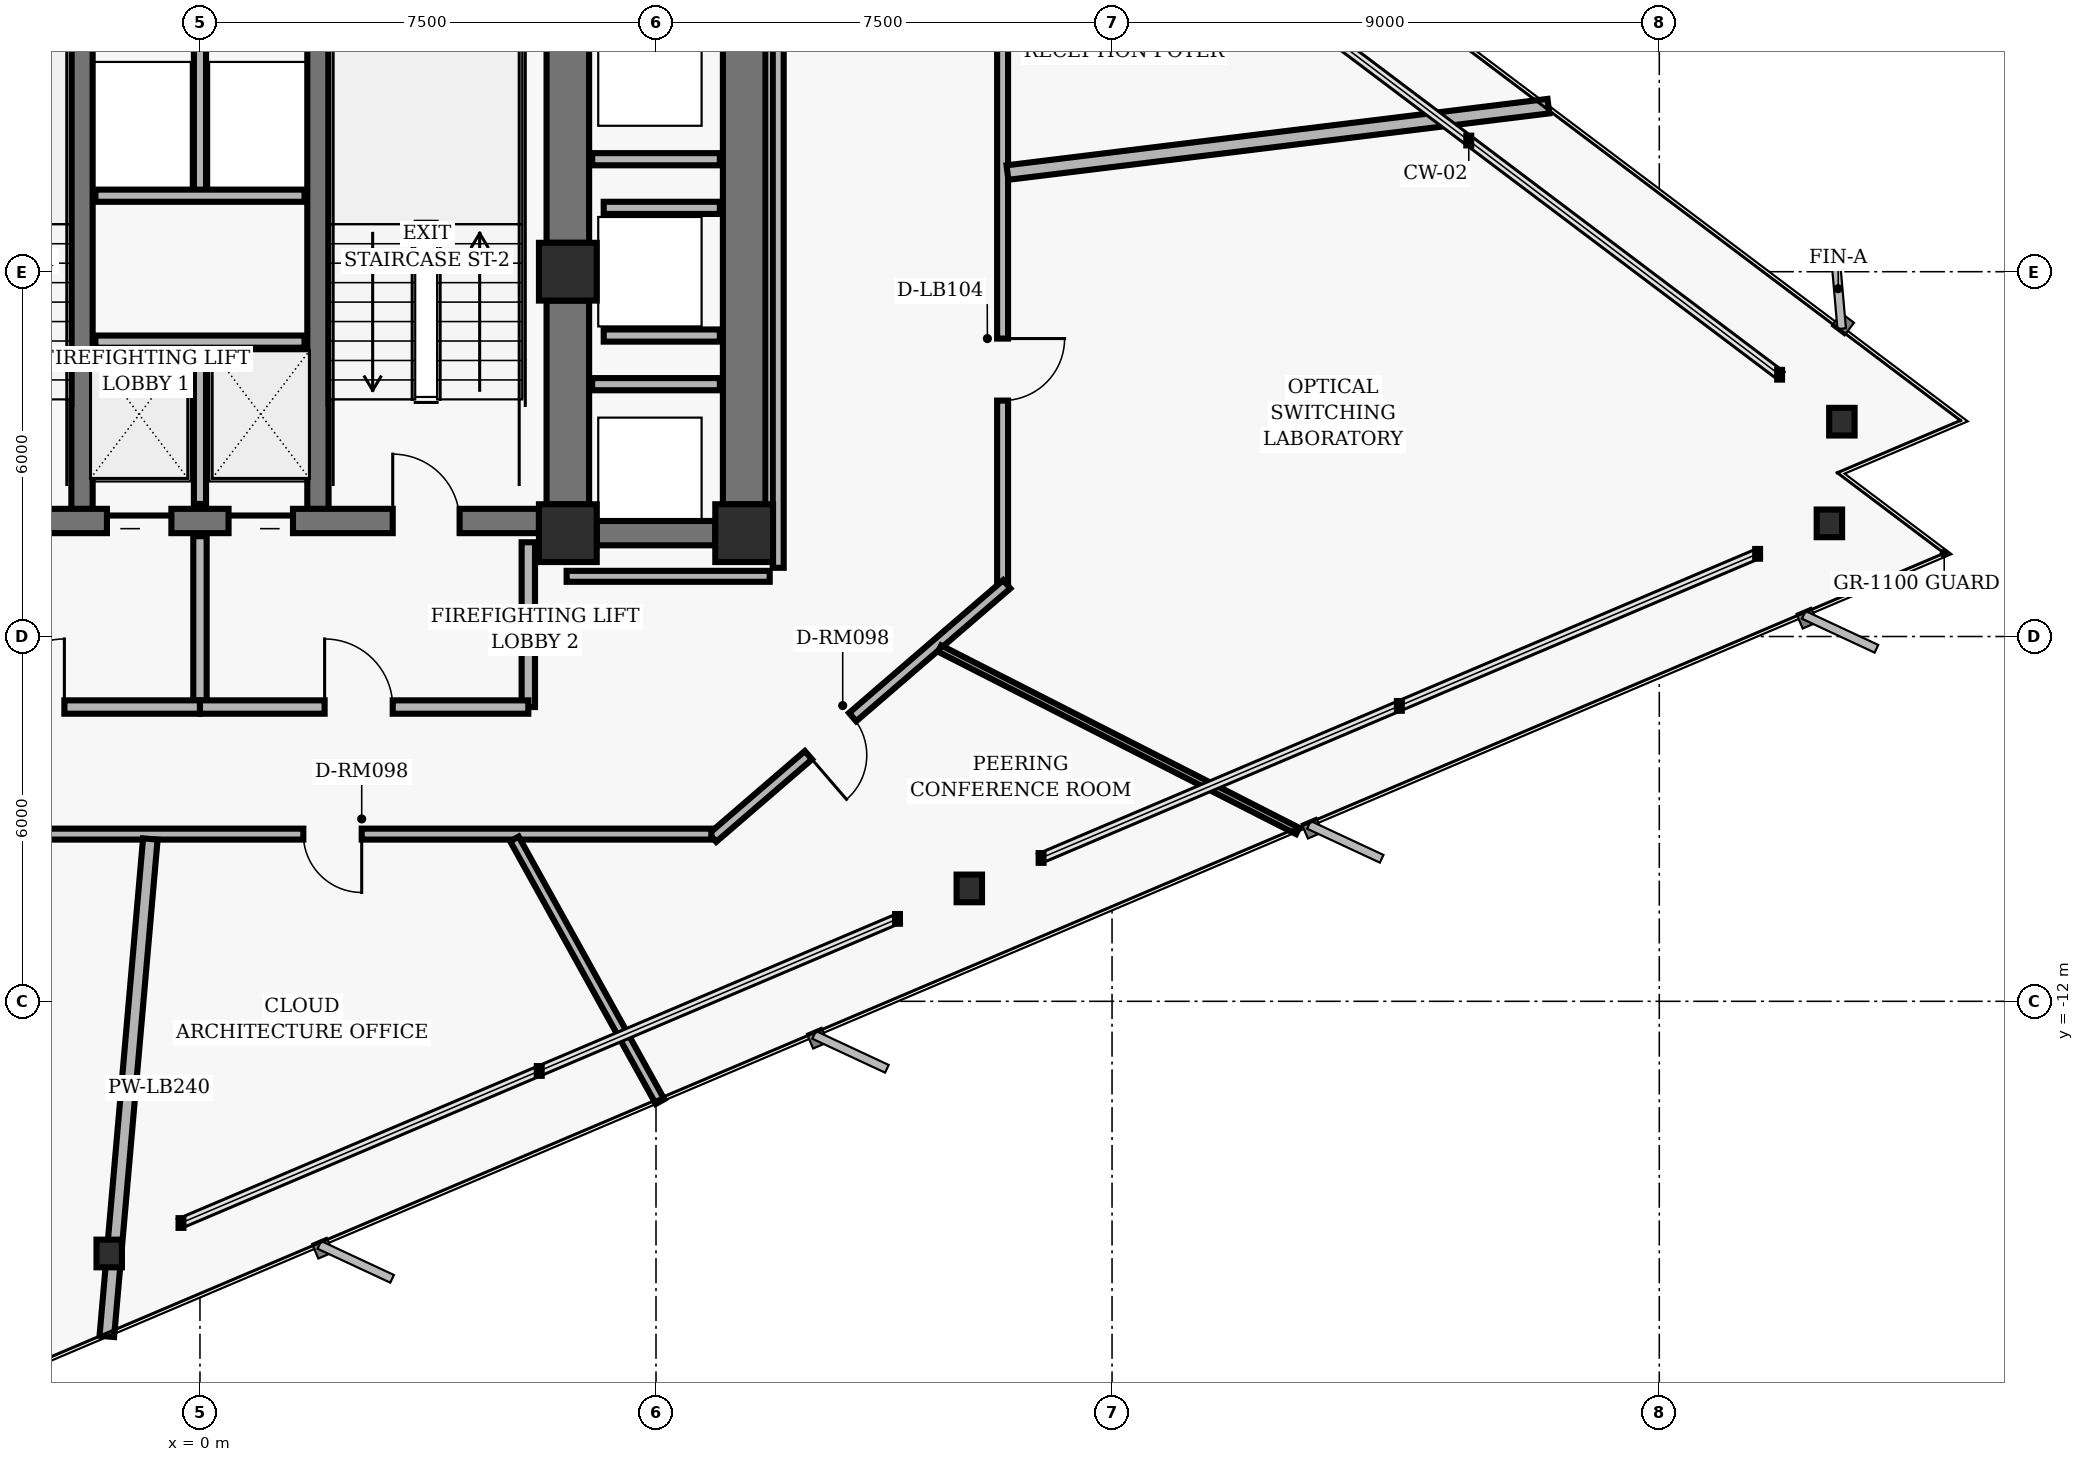
"""IFC4 building model, lengths in metres.
Left out: names, types, materials, properties, quantities, classifications, styles, units other than length and angle.
Written with IfcOpenShell. Run it as: python <this file> out.ifc"""

import sys

from ifc_helpers import new_model, si_unit, direction, frame, frame_2d, origin, origin_2d, place, context, subcontext, project, spatial, rectangle, hollow_rectangle, i_section, extrude, element, fill, save


model = new_model("IFC4")
c1 = context("Model", 3, precision=1e-05, world=origin(), true_north=direction((0.0, 1.0)))
c2 = subcontext(c1, "Body", "Model", "MODEL_VIEW")
j1 = project(units=[si_unit("LENGTHUNIT", "METRE"), si_unit("PLANEANGLEUNIT", "RADIAN")], contexts=[c1])
p1 = place(None, origin())
s1 = spatial("IfcSite", under=j1, at=p1, CompositionType="ELEMENT")
p2 = place(p1, origin())
s2 = spatial("IfcBuilding", under=s1, at=p2, CompositionType="ELEMENT")
p3 = place(p2, frame((0.0, 0.0, 63.04)))
s3 = spatial("IfcBuildingStorey", under=s2, at=p3, CompositionType="ELEMENT", Elevation=63.04)
for number, where, z_axis, x_axis in (
    (1, (6.05, 0.0, 0.0), (0.0, 0.0, 1.0), (1.0, 0.0, 0.0)),
    (2, (6.05, -4.3, 0.0), (0.0, 0.0, 1.0), (1.0, 0.0, 0.0)),
    (3, (8.95, -4.3, 0.0), (0.0, 0.0, 1.0), (1.0, 0.0, 0.0)),
):
    element("IfcColumn", number, at=place(p3, frame(where, z_axis=z_axis, x_axis=x_axis)), inside=s3, PredefinedType="COLUMN", context=c2, shape_type="SweptSolid", body=[
        extrude(hollow_rectangle(XDim=0.95, YDim=0.95, WallThickness=0.06, InnerFilletRadius=0.02, OuterFilletRadius=0.04, at=origin_2d()), origin(), (0.0, 0.0, 1.0), 3.36),
    ])
p4 = place(p3, frame((6.05, 0.475, 0.0), z_axis=(0.0, 0.0, 1.0), x_axis=(0.0, 1.0, 0.0)))
e4 = element("IfcWall", 4, at=p4, inside=s3, PredefinedType="SHEAR", context=c2, shape_type="SweptSolid", body=[
    extrude(rectangle(XDim=3.55, YDim=0.7, at=frame_2d((1.775, 0.0))), origin(), (0.0, 0.0, 1.0), 3.098),
])
p5 = place(p3, frame((6.05, -3.825, 0.0), z_axis=(0.0, 0.0, 1.0), x_axis=(0.0, 1.0, 0.0)))
e5 = element("IfcWall", 5, at=p5, inside=s3, PredefinedType="SHEAR", context=c2, shape_type="SweptSolid", body=[
    extrude(rectangle(XDim=3.35, YDim=0.7, at=frame_2d((1.675, 0.0))), origin(), (0.0, 0.0, 1.0), 3.098),
])
for number, where, z_axis, x_axis in (
    (6, (-1.94, -4.1, 0.0), (0.0, 0.0, 1.0), (0.0, 1.0, 0.0)),
    (7, (1.94, -4.1, 0.0), (0.0, 0.0, 1.0), (0.0, 1.0, 0.0)),
):
    element("IfcWall", number, at=place(p3, frame(where, z_axis=z_axis, x_axis=x_axis)), inside=s3, PredefinedType="SHEAR", context=c2, shape_type="SweptSolid", body=[
        extrude(rectangle(XDim=8.2, YDim=0.35, at=frame_2d((4.1, 0.0))), origin(), (0.0, 0.0, 1.0), 3.098),
    ])
p6 = place(p3, frame((-5.575, -4.1, 0.0), z_axis=(0.0, 0.0, 1.0), x_axis=(1.0, 0.0, 0.0)))
e8 = element("IfcWall", 8, at=p6, inside=s3, PredefinedType="SHEAR", context=c2, shape_type="SweptSolid", body=[
    extrude(rectangle(XDim=11.15, YDim=0.4, at=frame_2d((5.575, 0.0))), origin(), (0.0, 0.0, 1.0), 3.098),
])
p7 = place(p6, frame((1.305, 0.0, 0.0)))
e9 = element("IfcOpeningElement", 9, at=p7, cuts=e8, PredefinedType="OPENING", context=c2, shape_type="SweptSolid", body=[
    extrude(rectangle(XDim=1.1, YDim=2.04, at=frame_2d((0.55, 1.02))), frame((0.0, 0.21, 0.0), z_axis=(0.0, -1.0, 0.0), x_axis=(1.0, 0.0, 0.0)), (0.0, 0.0, 1.0), 0.42),
])
p8 = place(p6, frame((8.745, 0.0, 0.0)))
e10 = element("IfcOpeningElement", 10, at=p8, cuts=e8, PredefinedType="OPENING", context=c2, shape_type="SweptSolid", body=[
    extrude(rectangle(XDim=1.1, YDim=2.04, at=frame_2d((0.55, 1.02))), frame((0.0, 0.21, 0.0), z_axis=(0.0, -1.0, 0.0), x_axis=(1.0, 0.0, 0.0)), (0.0, 0.0, 1.0), 0.42),
])
p9 = place(p6, frame((4.045, 0.0, 0.0)))
e11 = element("IfcOpeningElement", 11, at=p9, cuts=e8, PredefinedType="OPENING", context=c2, shape_type="SweptSolid", body=[
    extrude(rectangle(XDim=1.06, YDim=2.04, at=frame_2d((0.53, 1.02))), frame((0.0, 0.21, 0.0), z_axis=(0.0, -1.0, 0.0), x_axis=(1.0, 0.0, 0.0)), (0.0, 0.0, 1.0), 0.42),
])
p10 = place(p6, frame((6.045, 0.0, 0.0)))
e12 = element("IfcOpeningElement", 12, at=p10, cuts=e8, PredefinedType="OPENING", context=c2, shape_type="SweptSolid", body=[
    extrude(rectangle(XDim=1.06, YDim=2.04, at=frame_2d((0.53, 1.02))), frame((0.0, 0.21, 0.0), z_axis=(0.0, -1.0, 0.0), x_axis=(1.0, 0.0, 0.0)), (0.0, 0.0, 1.0), 0.42),
])
p11 = place(p3, frame((8.95, -3.825, 0.0), z_axis=(0.0, 0.0, 1.0), x_axis=(0.0, 1.0, 0.0)))
e13 = element("IfcWall", 13, at=p11, inside=s3, PredefinedType="SHEAR", context=c2, shape_type="SweptSolid", body=[
    extrude(rectangle(XDim=7.85, YDim=0.7, at=frame_2d((3.925, 0.0))), origin(), (0.0, 0.0, 1.0), 3.098),
])
p12 = place(p3, frame((6.525, -4.3, 0.0), z_axis=(0.0, 0.0, 1.0), x_axis=(1.0, 0.0, 0.0)))
e14 = element("IfcWall", 14, at=p12, inside=s3, PredefinedType="SHEAR", context=c2, shape_type="SweptSolid", body=[
    extrude(rectangle(XDim=1.95, YDim=0.4, at=frame_2d((0.975, 0.0))), origin(), (0.0, 0.0, 1.0), 3.098),
])
for number, where, z_axis, x_axis in (
    (15, (27.003, -2.467, 0.0), (0.0, 0.0, 1.0), (1.0, 0.0, 0.0)),
    (16, (-1.493, -16.148, 0.0), (0.0, 0.0, 1.0), (1.0, 0.0, 0.0)),
    (17, (12.653, -10.143, 0.0), (0.0, 0.0, 1.0), (1.0, 0.0, 0.0)),
    (18, (26.798, -4.139, 0.0), (0.0, 0.0, 1.0), (1.0, 0.0, 0.0)),
):
    element("IfcColumn", number, at=place(p3, frame(where, z_axis=z_axis, x_axis=x_axis)), inside=s3, PredefinedType="COLUMN", context=c2, shape_type="SweptSolid", body=[
        extrude(i_section(OverallWidth=0.418, OverallDepth=0.455, WebThickness=0.042, FlangeThickness=0.068, FilletRadius=0.025, at=origin_2d()), origin(), (0.0, 0.0, 1.0), 3.36),
    ])
p13 = place(p3, frame((0.0, -3.82, 0.0), z_axis=(0.0, 0.0, 1.0), x_axis=(0.0, 1.0, 0.0)))
e19 = element("IfcWall", 19, at=p13, inside=s3, PredefinedType="PARTITIONING", context=c2, shape_type="SweptSolid", body=[
    extrude(rectangle(XDim=2.67, YDim=0.2, at=frame_2d((1.335, 0.0))), origin(), (0.0, 0.0, 1.0), 3.073),
])
p14 = place(p3, frame((-1.72, -1.15, 0.0), z_axis=(0.0, 0.0, 1.0), x_axis=(1.0, 0.0, 0.0)))
e20 = element("IfcWall", 20, at=p14, inside=s3, PredefinedType="PARTITIONING", context=c2, shape_type="SweptSolid", body=[
    extrude(rectangle(XDim=3.44, YDim=0.2, at=frame_2d((1.72, 0.0))), origin(), (0.0, 0.0, 1.0), 3.073),
])
p15 = place(p3, frame((5.4, -7.16, 0.0), z_axis=(0.0, 0.0, 1.0), x_axis=(0.0, 1.0, 0.0)))
e21 = element("IfcWall", 21, at=p15, inside=s3, PredefinedType="PARTITIONING", context=c2, shape_type="SweptSolid", body=[
    extrude(rectangle(XDim=2.71, YDim=0.22, at=frame_2d((1.355, 0.0))), origin(), (0.0, 0.0, 1.0), 3.073),
])
p16 = place(p3, frame((0.0, -7.16, 0.0), z_axis=(0.0, 0.0, 1.0), x_axis=(0.0, 1.0, 0.0)))
e22 = element("IfcWall", 22, at=p16, inside=s3, PredefinedType="PARTITIONING", context=c2, shape_type="SweptSolid", body=[
    extrude(rectangle(XDim=2.81, YDim=0.22, at=frame_2d((1.405, 0.0))), origin(), (0.0, 0.0, 1.0), 3.073),
])
p17 = place(p3, frame((-5.4, -7.16, 0.0), z_axis=(0.0, 0.0, 1.0), x_axis=(1.0, 0.0, 0.0)))
e23 = element("IfcWall", 23, at=p17, inside=s3, PredefinedType="PARTITIONING", context=c2, shape_type="SweptSolid", body=[
    extrude(rectangle(XDim=5.4, YDim=0.22, at=frame_2d((2.7, 0.0))), origin(), (0.0, 0.0, 1.0), 2.587),
])
p18 = place(p17, frame((2.05, 0.0, 0.0)))
e24 = element("IfcOpeningElement", 24, at=p18, cuts=e23, PredefinedType="OPENING", context=c2, shape_type="SweptSolid", body=[
    extrude(rectangle(XDim=1.12, YDim=2.02, at=frame_2d((0.56, 1.01))), frame((0.0, 0.12, 0.0), z_axis=(0.0, -1.0, 0.0), x_axis=(1.0, 0.0, 0.0)), (0.0, 0.0, 1.0), 0.24),
])
p19 = place(p3, frame((0.0, -7.16, 0.0), z_axis=(0.0, 0.0, 1.0), x_axis=(1.0, 0.0, 0.0)))
e25 = element("IfcWall", 25, at=p19, inside=s3, PredefinedType="PARTITIONING", context=c2, shape_type="SweptSolid", body=[
    extrude(rectangle(XDim=5.4, YDim=0.22, at=frame_2d((2.7, 0.0))), origin(), (0.0, 0.0, 1.0), 2.587),
])
p20 = place(p19, frame((2.05, 0.0, 0.0)))
e26 = element("IfcOpeningElement", 26, at=p20, cuts=e25, PredefinedType="OPENING", context=c2, shape_type="SweptSolid", body=[
    extrude(rectangle(XDim=1.12, YDim=2.02, at=frame_2d((0.56, 1.01))), frame((0.0, 0.12, 0.0), z_axis=(0.0, -1.0, 0.0), x_axis=(1.0, 0.0, 0.0)), (0.0, 0.0, 1.0), 0.24),
])
p21 = place(p3, frame((0.0, 1.25, 0.0), z_axis=(0.0, 0.0, 1.0), x_axis=(0.0, 1.0, 0.0)))
e27 = element("IfcWall", 27, at=p21, inside=s3, PredefinedType="PARTITIONING", context=c2, shape_type="SweptSolid", body=[
    extrude(rectangle(XDim=2.77, YDim=0.2, at=frame_2d((1.385, 0.0))), origin(), (0.0, 0.0, 1.0), 3.073),
])
p22 = place(p3, frame((-1.72, 1.25, 0.0), z_axis=(0.0, 0.0, 1.0), x_axis=(1.0, 0.0, 0.0)))
e28 = element("IfcWall", 28, at=p22, inside=s3, PredefinedType="PARTITIONING", context=c2, shape_type="SweptSolid", body=[
    extrude(rectangle(XDim=3.44, YDim=0.2, at=frame_2d((1.72, 0.0))), origin(), (0.0, 0.0, 1.0), 3.073),
])
for number, where, z_axis, x_axis in (
    (29, (6.45, -1.85, 0.0), (0.0, 0.0, 1.0), (1.0, 0.0, 0.0)),
    (30, (6.45, 1.85, 0.0), (0.0, 0.0, 1.0), (1.0, 0.0, 0.0)),
):
    element("IfcWall", number, at=place(p3, frame(where, z_axis=z_axis, x_axis=x_axis)), inside=s3, PredefinedType="PARTITIONING", context=c2, shape_type="SweptSolid", body=[
        extrude(rectangle(XDim=2.1, YDim=0.2, at=frame_2d((1.05, 0.0))), origin(), (0.0, 0.0, 1.0), 3.073),
    ])
for number, where, z_axis, x_axis in (
    (31, (6.64, -1.05, 0.0), (0.0, 0.0, 1.0), (1.0, 0.0, 0.0)),
    (32, (6.64, 1.05, 0.0), (0.0, 0.0, 1.0), (1.0, 0.0, 0.0)),
):
    element("IfcWall", number, at=place(p3, frame(where, z_axis=z_axis, x_axis=x_axis)), inside=s3, PredefinedType="PARTITIONING", context=c2, shape_type="SweptSolid", body=[
        extrude(rectangle(XDim=1.91, YDim=0.2, at=frame_2d((0.955, 0.0))), origin(), (0.0, 0.0, 1.0), 3.073),
    ])
p23 = place(p3, frame((13.2, 5.11, 0.0), z_axis=(0.0, 0.0, 1.0), x_axis=(0.0, -1.0, 0.0)))
e33 = element("IfcWall", 33, at=p23, inside=s3, PredefinedType="PARTITIONING", context=c2, shape_type="SweptSolid", body=[
    extrude(rectangle(XDim=10.22, YDim=0.18, at=frame_2d((5.11, 0.0))), origin(), (0.0, 0.0, 1.0), 3.073),
])
p24 = place(p23, frame((6.21, 0.0, 0.0)))
e34 = element("IfcOpeningElement", 34, at=p24, cuts=e33, PredefinedType="OPENING", context=c2, shape_type="SweptSolid", body=[
    extrude(rectangle(XDim=1.02, YDim=2.02, at=frame_2d((0.51, 1.01))), frame((0.0, 0.1, 0.0), z_axis=(0.0, -1.0, 0.0), x_axis=(1.0, 0.0, 0.0)), (0.0, 0.0, 1.0), 0.2),
])
p25 = place(p3, frame((13.268, -5.141, 0.0), z_axis=(0.0, 0.0, 1.0), x_axis=(-0.757534501725, -0.65279512766, 0.0)))
e35 = element("IfcWall", 35, at=p25, inside=s3, PredefinedType="PARTITIONING", context=c2, shape_type="SweptSolid", body=[
    extrude(rectangle(XDim=6.385, YDim=0.18, at=frame_2d((3.192, 0.0))), origin(), (0.0, 0.0, 1.0), 3.073),
])
p26 = place(p25, frame((3.346, 0.0, 0.0)))
e36 = element("IfcOpeningElement", 36, at=p26, cuts=e35, PredefinedType="OPENING", context=c2, shape_type="SweptSolid", body=[
    extrude(rectangle(XDim=0.96, YDim=2.02, at=frame_2d((0.48, 1.01))), frame((0.0, 0.1, 0.0), z_axis=(0.0, -1.0, 0.0), x_axis=(1.0, 0.0, 0.0)), (0.0, 0.0, 1.0), 0.2),
])
p27 = place(p3, frame((8.41, -9.25, 0.0), z_axis=(0.0, 0.0, 1.0), x_axis=(-1.0, 0.0, 0.0)))
e37 = element("IfcWall", 37, at=p27, inside=s3, PredefinedType="PARTITIONING", context=c2, shape_type="SweptSolid", body=[
    extrude(rectangle(XDim=17.0, YDim=0.18, at=frame_2d((8.5, 0.0))), origin(), (0.0, 0.0, 1.0), 2.587),
])
p28 = place(p27, frame((12.127, 0.0, 0.0)))
e38 = element("IfcOpeningElement", 38, at=p28, cuts=e37, PredefinedType="OPENING", context=c2, shape_type="SweptSolid", body=[
    extrude(rectangle(XDim=0.96, YDim=2.02, at=frame_2d((0.48, 1.01))), frame((0.0, 0.1, 0.0), z_axis=(0.0, -1.0, 0.0), x_axis=(1.0, 0.0, 0.0)), (0.0, 0.0, 1.0), 0.2),
])
p29 = place(p27, frame((5.75, 0.0, 0.0)))
e39 = element("IfcOpeningElement", 39, at=p29, cuts=e37, PredefinedType="OPENING", context=c2, shape_type="SweptSolid", body=[
    extrude(rectangle(XDim=0.96, YDim=2.02, at=frame_2d((0.48, 1.01))), frame((0.0, 0.1, 0.0), z_axis=(0.0, -1.0, 0.0), x_axis=(1.0, 0.0, 0.0)), (0.0, 0.0, 1.0), 0.2),
])
p30 = place(p3, frame((6.03, -5.01, 0.0), z_axis=(0.0, 0.0, 1.0), x_axis=(1.0, 0.0, 0.0)))
e40 = element("IfcWall", 40, at=p30, inside=s3, PredefinedType="PARTITIONING", context=c2, shape_type="SweptSolid", body=[
    extrude(rectangle(XDim=3.34, YDim=0.18, at=frame_2d((1.67, 0.0))), origin(), (0.0, 0.0, 1.0), 3.073),
])
p31 = place(p3, frame((9.51, -4.87, 0.0), z_axis=(0.0, 0.0, 1.0), x_axis=(0.0, 1.0, 0.0)))
e41 = element("IfcWall", 41, at=p31, inside=s3, PredefinedType="PARTITIONING", context=c2, shape_type="SweptSolid", body=[
    extrude(rectangle(XDim=9.74, YDim=0.18, at=frame_2d((4.87, 0.0))), origin(), (0.0, 0.0, 1.0), 3.073),
])
p32 = place(p3, frame((-0.816, -9.33, 0.0), z_axis=(0.0, 0.0, 1.0), x_axis=(-0.087131179551, -0.996196846788, 0.0)))
e42 = element("IfcWall", 42, at=p32, inside=s3, PredefinedType="PARTITIONING", context=c2, shape_type="SweptSolid", body=[
    extrude(rectangle(XDim=8.213, YDim=0.24, at=frame_2d((4.106, 0.0))), origin(), (0.0, 0.0, 1.0), 3.073),
])
p33 = place(p3, frame((5.172, -9.33, 0.0), z_axis=(0.0, 0.0, 1.0), x_axis=(0.484815832005, -0.874616263876, 0.0)))
e43 = element("IfcWall", 43, at=p33, inside=s3, PredefinedType="PARTITIONING", context=c2, shape_type="SweptSolid", body=[
    extrude(rectangle(XDim=4.938, YDim=0.16, at=frame_2d((2.469, 0.0))), origin(), (0.0, 0.0, 1.0), 3.073),
])
p34 = place(p3, frame((12.164, -6.198, 0.0), z_axis=(0.0, 0.0, 1.0), x_axis=(0.891002560884, -0.453998278079, 0.0)))
e44 = element("IfcWall", 44, at=p34, inside=s3, PredefinedType="MOVABLE", context=c2, shape_type="SweptSolid", body=[
    extrude(rectangle(XDim=6.608, YDim=0.115, at=frame_2d((3.304, 0.0))), origin(), (0.0, 0.0, 1.0), 3.073),
])
p35 = place(p3, frame((13.28, 1.631, 0.0), z_axis=(0.0, 0.0, 1.0), x_axis=(0.992547039209, 0.121862114529, 0.0)))
e45 = element("IfcWall", 45, at=p35, inside=s3, PredefinedType="PARTITIONING", context=c2, shape_type="SweptSolid", body=[
    extrude(rectangle(XDim=8.963, YDim=0.24, at=frame_2d((4.482, 0.0))), origin(), (0.0, 0.0, 1.0), 3.073),
])
p36 = place(p8, origin())
e46 = element("IfcDoor", 46, at=p36, inside=s3, OperationType="SINGLE_SWING_LEFT", PredefinedType="DOOR", context=c2, shape_type="SweptSolid", body=[
    extrude(rectangle(XDim=1.1, YDim=2.04, at=frame_2d((0.55, 1.02))), frame((0.0, 0.025, 0.0), z_axis=(0.0, -1.0, 0.0), x_axis=(1.0, 0.0, 0.0)), (0.0, 0.0, 1.0), 0.05),
])
fill(e10, e46)
p37 = place(p9, origin())
e47 = element("IfcDoor", 47, at=p37, inside=s3, OperationType="SLIDING_TO_LEFT", PredefinedType="DOOR", context=c2, shape_type="SweptSolid", body=[
    extrude(rectangle(XDim=1.06, YDim=2.04, at=frame_2d((0.53, 1.02))), frame((0.0, 0.025, 0.0), z_axis=(0.0, -1.0, 0.0), x_axis=(1.0, 0.0, 0.0)), (0.0, 0.0, 1.0), 0.05),
])
fill(e11, e47)
p38 = place(p10, origin())
e48 = element("IfcDoor", 48, at=p38, inside=s3, OperationType="SLIDING_TO_RIGHT", PredefinedType="DOOR", context=c2, shape_type="SweptSolid", body=[
    extrude(rectangle(XDim=1.06, YDim=2.04, at=frame_2d((0.53, 1.02))), frame((0.0, 0.025, 0.0), z_axis=(0.0, -1.0, 0.0), x_axis=(1.0, 0.0, 0.0)), (0.0, 0.0, 1.0), 0.05),
])
fill(e12, e48)
p39 = place(p18, origin())
e49 = element("IfcDoor", 49, at=p39, inside=s3, OperationType="SINGLE_SWING_RIGHT", PredefinedType="DOOR", context=c2, shape_type="SweptSolid", body=[
    extrude(rectangle(XDim=1.12, YDim=2.02, at=frame_2d((0.56, 1.01))), frame((0.0, 0.025, 0.0), z_axis=(0.0, -1.0, 0.0), x_axis=(1.0, 0.0, 0.0)), (0.0, 0.0, 1.0), 0.05),
])
fill(e24, e49)
p40 = place(p20, origin())
e50 = element("IfcDoor", 50, at=p40, inside=s3, OperationType="SINGLE_SWING_LEFT", PredefinedType="DOOR", context=c2, shape_type="SweptSolid", body=[
    extrude(rectangle(XDim=1.12, YDim=2.02, at=frame_2d((0.56, 1.01))), frame((0.0, 0.025, 0.0), z_axis=(0.0, -1.0, 0.0), x_axis=(1.0, 0.0, 0.0)), (0.0, 0.0, 1.0), 0.05),
])
fill(e26, e50)
p41 = place(p29, origin())
e51 = element("IfcDoor", 51, at=p41, inside=s3, OperationType="SINGLE_SWING_LEFT", PredefinedType="DOOR", context=c2, shape_type="SweptSolid", body=[
    extrude(rectangle(XDim=0.96, YDim=2.02, at=frame_2d((0.48, 1.01))), frame((0.0, 0.025, 0.0), z_axis=(0.0, -1.0, 0.0), x_axis=(1.0, 0.0, 0.0)), (0.0, 0.0, 1.0), 0.05),
])
fill(e39, e51)
p42 = place(p26, origin())
e52 = element("IfcDoor", 52, at=p42, inside=s3, OperationType="SINGLE_SWING_RIGHT", PredefinedType="DOOR", context=c2, shape_type="SweptSolid", body=[
    extrude(rectangle(XDim=0.96, YDim=2.02, at=frame_2d((0.48, 1.01))), frame((0.0, 0.025, 0.0), z_axis=(0.0, -1.0, 0.0), x_axis=(1.0, 0.0, 0.0)), (0.0, 0.0, 1.0), 0.05),
])
fill(e36, e52)
p43 = place(p24, origin())
e53 = element("IfcDoor", 53, at=p43, inside=s3, OperationType="SINGLE_SWING_LEFT", PredefinedType="DOOR", context=c2, shape_type="SweptSolid", body=[
    extrude(rectangle(XDim=1.02, YDim=2.02, at=frame_2d((0.51, 1.01))), frame((0.0, 0.025, 0.0), z_axis=(0.0, -1.0, 0.0), x_axis=(1.0, 0.0, 0.0)), (0.0, 0.0, 1.0), 0.05),
])
fill(e34, e53)
save(model, sys.argv[1])
